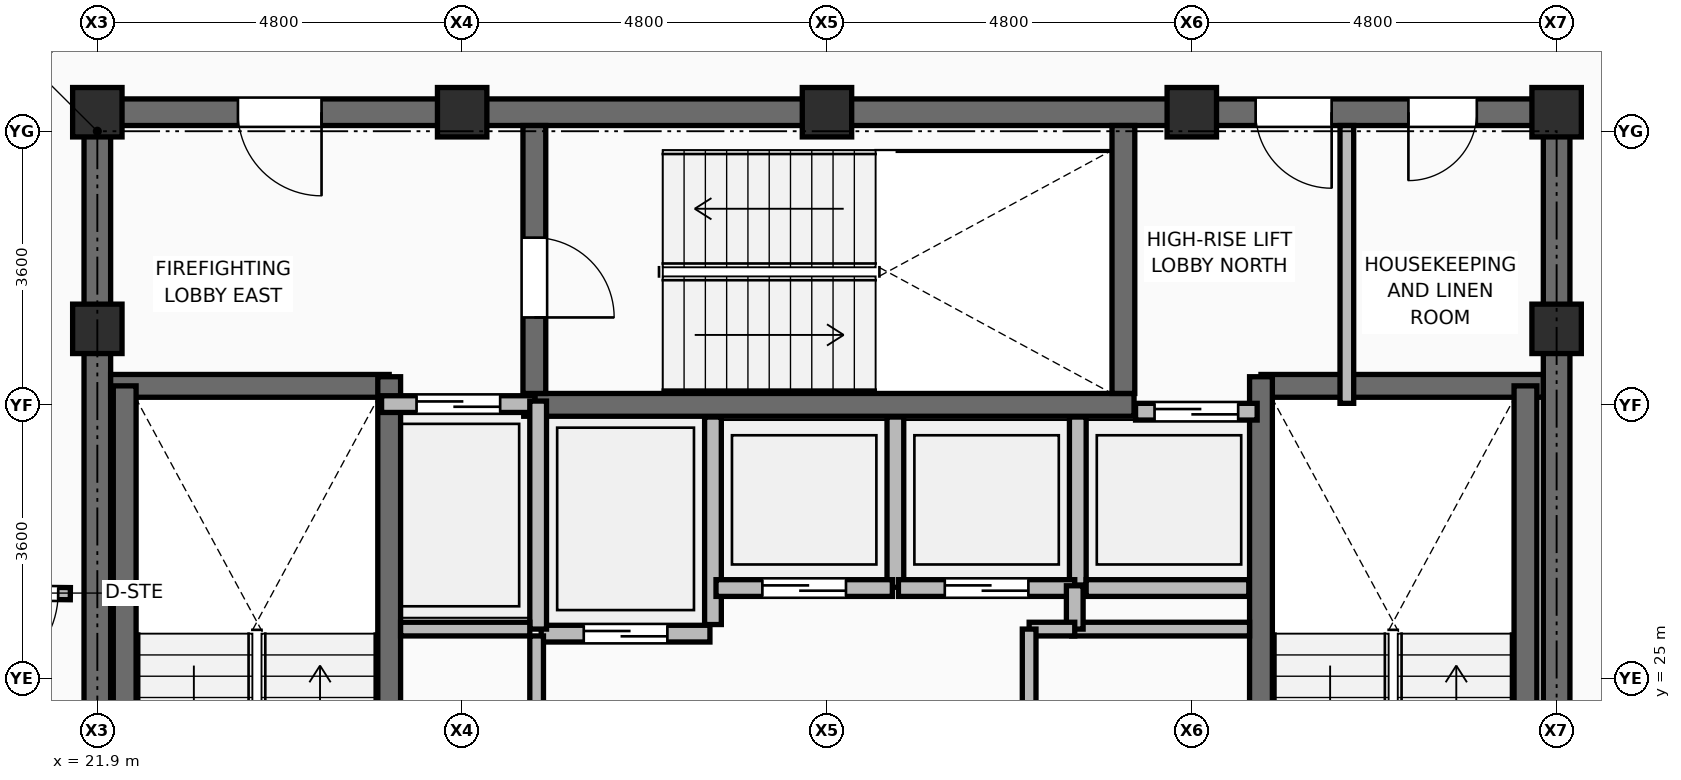
"""IFC4 building model, lengths in metres.
Left out: names, types, materials, properties, quantities, classifications, styles, units other than length and angle.
Written with IfcOpenShell. Run it as: python <this file> out.ifc"""

import sys

from ifc_helpers import new_model, si_unit, direction, frame, frame_2d, origin, origin_2d, place, context, subcontext, project, spatial, rectangle, extrude, element, fill, save


model = new_model("IFC4")
c1 = context("Model", 3, precision=1e-05, world=origin(), true_north=direction((0.0, 1.0)))
c2 = subcontext(c1, "Body", "Model", "MODEL_VIEW")
j1 = project(units=[si_unit("LENGTHUNIT", "METRE"), si_unit("PLANEANGLEUNIT", "RADIAN")], contexts=[c1])
p1 = place(None, origin())
s1 = spatial("IfcSite", under=j1, at=p1, CompositionType="ELEMENT")
p2 = place(p1, origin())
s2 = spatial("IfcBuilding", under=s1, at=p2, CompositionType="ELEMENT")
p3 = place(p2, frame((0.0, 0.0, 275.1)))
s3 = spatial("IfcBuildingStorey", under=s2, at=p3, CompositionType="ELEMENT", Elevation=275.1)
for number, where, z_axis, x_axis in (
    (1, (21.9, 29.6, 0.0), (0.0, 0.0, 1.0), (1.0, 0.0, 0.0)),
    (2, (41.1, 29.6, 0.0), (0.0, 0.0, 1.0), (1.0, 0.0, 0.0)),
    (3, (21.9, 32.45, 0.0), (0.0, 0.0, 1.0), (1.0, 0.0, 0.0)),
    (4, (26.7, 32.45, 0.0), (0.0, 0.0, 1.0), (1.0, 0.0, 0.0)),
    (5, (31.5, 32.45, 0.0), (0.0, 0.0, 1.0), (1.0, 0.0, 0.0)),
    (6, (36.3, 32.45, 0.0), (0.0, 0.0, 1.0), (1.0, 0.0, 0.0)),
    (7, (41.1, 32.45, 0.0), (0.0, 0.0, 1.0), (1.0, 0.0, 0.0)),
):
    element("IfcColumn", number, at=place(p3, frame(where, z_axis=z_axis, x_axis=x_axis)), inside=s3, PredefinedType="COLUMN", context=c2, shape_type="SweptSolid", body=[
        extrude(rectangle(XDim=0.65, YDim=0.65, at=origin_2d()), origin(), (0.0, 0.0, 1.0), 3.75),
    ])
p4 = place(p3, frame((30.0, 25.71, 0.0), z_axis=(0.0, 0.0, 1.0), x_axis=(0.0, 1.0, 0.0)))
e8 = element("IfcWall", 8, at=p4, inside=s3, PredefinedType="PARTITIONING", context=c2, shape_type="SweptSolid", body=[
    extrude(rectangle(XDim=2.73, YDim=0.22, at=frame_2d((1.365, 0.0))), origin(), (0.0, 0.0, 1.0), 3.545),
])
p5 = place(p3, frame((32.4, 26.2, 0.0), z_axis=(0.0, 0.0, 1.0), x_axis=(0.0, 1.0, 0.0)))
e9 = element("IfcWall", 9, at=p5, inside=s3, PredefinedType="PARTITIONING", context=c2, shape_type="SweptSolid", body=[
    extrude(rectangle(XDim=2.24, YDim=0.22, at=frame_2d((1.12, 0.0))), origin(), (0.0, 0.0, 1.0), 3.545),
])
p6 = place(p3, frame((34.8, 26.23, 0.0), z_axis=(0.0, 0.0, 1.0), x_axis=(0.0, 1.0, 0.0)))
e10 = element("IfcWall", 10, at=p6, inside=s3, PredefinedType="PARTITIONING", context=c2, shape_type="SweptSolid", body=[
    extrude(rectangle(XDim=2.21, YDim=0.22, at=frame_2d((1.105, 0.0))), origin(), (0.0, 0.0, 1.0), 3.545),
])
p7 = place(p3, frame((34.91, 26.19, 0.0), z_axis=(0.0, 0.0, 1.0), x_axis=(1.0, 0.0, 0.0)))
e11 = element("IfcWall", 11, at=p7, inside=s3, PredefinedType="PARTITIONING", context=c2, shape_type="SweptSolid", body=[
    extrude(rectangle(XDim=2.14, YDim=0.22, at=frame_2d((1.07, 0.0))), origin(), (0.0, 0.0, 1.0), 3.545),
])
p8 = place(p3, frame((21.725, 32.45, 0.0), z_axis=(0.0, 0.0, 1.0), x_axis=(1.0, 0.0, 0.0)))
e12 = element("IfcWall", 12, at=p8, inside=s3, PredefinedType="SHEAR", context=c2, shape_type="SweptSolid", body=[
    extrude(rectangle(XDim=19.55, YDim=0.35, at=frame_2d((9.775, 0.0))), origin(), (0.0, 0.0, 1.0), 3.57),
])
p9 = place(p8, frame((2.025, 0.0, 0.0)))
e13 = element("IfcOpeningElement", 13, at=p9, cuts=e12, PredefinedType="OPENING", context=c2, shape_type="SweptSolid", body=[
    extrude(rectangle(XDim=1.1, YDim=2.1, at=frame_2d((0.55, 1.05))), frame((0.0, 0.185, 0.0), z_axis=(0.0, -1.0, 0.0), x_axis=(1.0, 0.0, 0.0)), (0.0, 0.0, 1.0), 0.37),
])
p10 = place(p8, frame((15.415, 0.0, 0.0)))
e14 = element("IfcOpeningElement", 14, at=p10, cuts=e12, PredefinedType="OPENING", context=c2, shape_type="SweptSolid", body=[
    extrude(rectangle(XDim=1.0, YDim=2.1, at=frame_2d((0.5, 1.05))), frame((0.0, 0.185, 0.0), z_axis=(0.0, -1.0, 0.0), x_axis=(1.0, 0.0, 0.0)), (0.0, 0.0, 1.0), 0.37),
])
p11 = place(p8, frame((17.425, 0.0, 0.0)))
e15 = element("IfcOpeningElement", 15, at=p11, cuts=e12, PredefinedType="OPENING", context=c2, shape_type="SweptSolid", body=[
    extrude(rectangle(XDim=0.9, YDim=2.1, at=frame_2d((0.45, 1.05))), frame((0.0, 0.185, 0.0), z_axis=(0.0, -1.0, 0.0), x_axis=(1.0, 0.0, 0.0)), (0.0, 0.0, 1.0), 0.37),
])
p12 = place(p3, frame((21.9, 17.975, 0.0), z_axis=(0.0, 0.0, 1.0), x_axis=(0.0, 1.0, 0.0)))
e16 = element("IfcWall", 16, at=p12, inside=s3, PredefinedType="SHEAR", context=c2, shape_type="SweptSolid", body=[
    extrude(rectangle(XDim=14.3, YDim=0.35, at=frame_2d((7.15, 0.0))), origin(), (0.0, 0.0, 1.0), 3.57),
])
p13 = place(p3, frame((41.1, 17.975, 0.0), z_axis=(0.0, 0.0, 1.0), x_axis=(0.0, 1.0, 0.0)))
e17 = element("IfcWall", 17, at=p13, inside=s3, PredefinedType="SHEAR", context=c2, shape_type="SweptSolid", body=[
    extrude(rectangle(XDim=14.3, YDim=0.35, at=frame_2d((7.15, 0.0))), origin(), (0.0, 0.0, 1.0), 3.57),
])
p14 = place(p13, frame((3.485, 0.0, 0.0)))
e18 = element("IfcOpeningElement", 18, at=p14, cuts=e17, PredefinedType="OPENING", context=c2, shape_type="SweptSolid", body=[
    extrude(rectangle(XDim=1.05, YDim=2.1, at=frame_2d((0.525, 1.05))), frame((0.0, 0.185, 0.0), z_axis=(0.0, -1.0, 0.0), x_axis=(1.0, 0.0, 0.0)), (0.0, 0.0, 1.0), 0.37),
])
p15 = place(p3, frame((22.075, 28.85, 0.0), z_axis=(0.0, 0.0, 1.0), x_axis=(1.0, 0.0, 0.0)))
e19 = element("IfcWall", 19, at=p15, inside=s3, PredefinedType="SHEAR", context=c2, shape_type="SweptSolid", body=[
    extrude(rectangle(XDim=3.665, YDim=0.3, at=frame_2d((1.833, 0.0))), origin(), (0.0, 0.0, 1.0), 3.57),
])
p16 = place(p3, frame((25.74, 20.98, 0.0), z_axis=(0.0, 0.0, 1.0), x_axis=(0.0, 1.0, 0.0)))
e20 = element("IfcWall", 20, at=p16, inside=s3, PredefinedType="SHEAR", context=c2, shape_type="SweptSolid", body=[
    extrude(rectangle(XDim=7.99, YDim=0.3, at=frame_2d((3.995, 0.0))), origin(), (0.0, 0.0, 1.0), 3.57),
])
p17 = place(p3, frame((22.26, 21.1, 0.0), z_axis=(0.0, 0.0, 1.0), x_axis=(0.0, 1.0, 0.0)))
e21 = element("IfcWall", 21, at=p17, inside=s3, PredefinedType="SHEAR", context=c2, shape_type="SweptSolid", body=[
    extrude(rectangle(XDim=7.75, YDim=0.3, at=frame_2d((3.875, 0.0))), origin(), (0.0, 0.0, 1.0), 3.57),
])
p18 = place(p3, frame((37.21, 28.85, 0.0), z_axis=(0.0, 0.0, 1.0), x_axis=(1.0, 0.0, 0.0)))
e22 = element("IfcWall", 22, at=p18, inside=s3, PredefinedType="SHEAR", context=c2, shape_type="SweptSolid", body=[
    extrude(rectangle(XDim=3.715, YDim=0.3, at=frame_2d((1.857, 0.0))), origin(), (0.0, 0.0, 1.0), 3.57),
])
p19 = place(p3, frame((37.21, 20.98, 0.0), z_axis=(0.0, 0.0, 1.0), x_axis=(0.0, 1.0, 0.0)))
e23 = element("IfcWall", 23, at=p19, inside=s3, PredefinedType="SHEAR", context=c2, shape_type="SweptSolid", body=[
    extrude(rectangle(XDim=7.99, YDim=0.3, at=frame_2d((3.995, 0.0))), origin(), (0.0, 0.0, 1.0), 3.57),
])
p20 = place(p3, frame((40.69, 22.65, 0.0), z_axis=(0.0, 0.0, 1.0), x_axis=(0.0, 1.0, 0.0)))
e24 = element("IfcWall", 24, at=p20, inside=s3, PredefinedType="SHEAR", context=c2, shape_type="SweptSolid", body=[
    extrude(rectangle(XDim=6.2, YDim=0.3, at=frame_2d((3.1, 0.0))), origin(), (0.0, 0.0, 1.0), 3.57),
])
p21 = place(p3, frame((27.51, 28.6, 0.0), z_axis=(0.0, 0.0, 1.0), x_axis=(1.0, 0.0, 0.0)))
e25 = element("IfcWall", 25, at=p21, inside=s3, PredefinedType="SHEAR", context=c2, shape_type="SweptSolid", body=[
    extrude(rectangle(XDim=8.03, YDim=0.3, at=frame_2d((4.015, 0.0))), origin(), (0.0, 0.0, 1.0), 3.57),
])
p22 = place(p3, frame((27.65, 28.75, 0.0), z_axis=(0.0, 0.0, 1.0), x_axis=(0.0, 1.0, 0.0)))
e26 = element("IfcWall", 26, at=p22, inside=s3, PredefinedType="SHEAR", context=c2, shape_type="SweptSolid", body=[
    extrude(rectangle(XDim=3.525, YDim=0.3, at=frame_2d((1.762, 0.0))), origin(), (0.0, 0.0, 1.0), 3.57),
])
p23 = place(p22, frame((1.0, 0.0, 0.0)))
e27 = element("IfcOpeningElement", 27, at=p23, cuts=e26, PredefinedType="OPENING", context=c2, shape_type="SweptSolid", body=[
    extrude(rectangle(XDim=1.05, YDim=2.1, at=frame_2d((0.525, 1.05))), frame((0.0, 0.16, 0.0), z_axis=(0.0, -1.0, 0.0), x_axis=(1.0, 0.0, 0.0)), (0.0, 0.0, 1.0), 0.32),
])
p24 = place(p3, frame((35.4, 28.75, 0.0), z_axis=(0.0, 0.0, 1.0), x_axis=(0.0, 1.0, 0.0)))
e28 = element("IfcWall", 28, at=p24, inside=s3, PredefinedType="SHEAR", context=c2, shape_type="SweptSolid", body=[
    extrude(rectangle(XDim=3.525, YDim=0.3, at=frame_2d((1.762, 0.0))), origin(), (0.0, 0.0, 1.0), 3.57),
])
p25 = place(p3, frame((25.64, 28.61, 0.0), z_axis=(0.0, 0.0, 1.0), x_axis=(1.0, 0.0, 0.0)))
e29 = element("IfcWall", 29, at=p25, inside=s3, PredefinedType="PARTITIONING", context=c2, shape_type="SweptSolid", body=[
    extrude(rectangle(XDim=2.02, YDim=0.22, at=frame_2d((1.01, 0.0))), origin(), (0.0, 0.0, 1.0), 3.55),
])
p26 = place(p25, frame((0.46, 0.0, 0.0)))
e30 = element("IfcOpeningElement", 30, at=p26, cuts=e29, PredefinedType="OPENING", context=c2, shape_type="SweptSolid", body=[
    extrude(rectangle(XDim=1.1, YDim=2.2, at=frame_2d((0.55, 1.1))), frame((0.0, 0.12, 0.0), z_axis=(0.0, -1.0, 0.0), x_axis=(1.0, 0.0, 0.0)), (0.0, 0.0, 1.0), 0.24),
])
p27 = place(p3, frame((27.74, 25.59, 0.0), z_axis=(0.0, 0.0, 1.0), x_axis=(1.0, 0.0, 0.0)))
e31 = element("IfcWall", 31, at=p27, inside=s3, PredefinedType="PARTITIONING", context=c2, shape_type="SweptSolid", body=[
    extrude(rectangle(XDim=2.22, YDim=0.22, at=frame_2d((1.11, 0.0))), origin(), (0.0, 0.0, 1.0), 3.55),
])
p28 = place(p27, frame((0.56, 0.0, 0.0)))
e32 = element("IfcOpeningElement", 32, at=p28, cuts=e31, PredefinedType="OPENING", context=c2, shape_type="SweptSolid", body=[
    extrude(rectangle(XDim=1.1, YDim=2.2, at=frame_2d((0.55, 1.1))), frame((0.0, 0.12, 0.0), z_axis=(0.0, -1.0, 0.0), x_axis=(1.0, 0.0, 0.0)), (0.0, 0.0, 1.0), 0.24),
])
p29 = place(p3, frame((30.04, 26.19, 0.0), z_axis=(0.0, 0.0, 1.0), x_axis=(1.0, 0.0, 0.0)))
e33 = element("IfcWall", 33, at=p29, inside=s3, PredefinedType="PARTITIONING", context=c2, shape_type="SweptSolid", body=[
    extrude(rectangle(XDim=2.32, YDim=0.22, at=frame_2d((1.16, 0.0))), origin(), (0.0, 0.0, 1.0), 3.55),
])
p30 = place(p29, frame((0.61, 0.0, 0.0)))
e34 = element("IfcOpeningElement", 34, at=p30, cuts=e33, PredefinedType="OPENING", context=c2, shape_type="SweptSolid", body=[
    extrude(rectangle(XDim=1.1, YDim=2.2, at=frame_2d((0.55, 1.1))), frame((0.0, 0.12, 0.0), z_axis=(0.0, -1.0, 0.0), x_axis=(1.0, 0.0, 0.0)), (0.0, 0.0, 1.0), 0.24),
])
p31 = place(p3, frame((32.44, 26.19, 0.0), z_axis=(0.0, 0.0, 1.0), x_axis=(1.0, 0.0, 0.0)))
e35 = element("IfcWall", 35, at=p31, inside=s3, PredefinedType="PARTITIONING", context=c2, shape_type="SweptSolid", body=[
    extrude(rectangle(XDim=2.32, YDim=0.22, at=frame_2d((1.16, 0.0))), origin(), (0.0, 0.0, 1.0), 3.55),
])
p32 = place(p31, frame((0.61, 0.0, 0.0)))
e36 = element("IfcOpeningElement", 36, at=p32, cuts=e35, PredefinedType="OPENING", context=c2, shape_type="SweptSolid", body=[
    extrude(rectangle(XDim=1.1, YDim=2.2, at=frame_2d((0.55, 1.1))), frame((0.0, 0.12, 0.0), z_axis=(0.0, -1.0, 0.0), x_axis=(1.0, 0.0, 0.0)), (0.0, 0.0, 1.0), 0.24),
])
p33 = place(p3, frame((35.56, 28.51, 0.0), z_axis=(0.0, 0.0, 1.0), x_axis=(1.0, 0.0, 0.0)))
e37 = element("IfcWall", 37, at=p33, inside=s3, PredefinedType="PARTITIONING", context=c2, shape_type="SweptSolid", body=[
    extrude(rectangle(XDim=1.6, YDim=0.22, at=frame_2d((0.8, 0.0))), origin(), (0.0, 0.0, 1.0), 3.55),
])
p34 = place(p33, frame((0.25, 0.0, 0.0)))
e38 = element("IfcOpeningElement", 38, at=p34, cuts=e37, PredefinedType="OPENING", context=c2, shape_type="SweptSolid", body=[
    extrude(rectangle(XDim=1.1, YDim=2.2, at=frame_2d((0.55, 1.1))), frame((0.0, 0.12, 0.0), z_axis=(0.0, -1.0, 0.0), x_axis=(1.0, 0.0, 0.0)), (0.0, 0.0, 1.0), 0.24),
])
p35 = place(p3, frame((27.7, 25.65, 0.0), z_axis=(0.0, 0.0, 1.0), x_axis=(0.0, 1.0, 0.0)))
e39 = element("IfcWall", 39, at=p35, inside=s3, PredefinedType="PARTITIONING", context=c2, shape_type="SweptSolid", body=[
    extrude(rectangle(XDim=3.0, YDim=0.22, at=frame_2d((1.5, 0.0))), origin(), (0.0, 0.0, 1.0), 3.55),
])
p36 = place(p3, frame((25.89, 25.65, 0.0), z_axis=(0.0, 0.0, 1.0), x_axis=(1.0, 0.0, 0.0)))
e40 = element("IfcWall", 40, at=p36, inside=s3, PredefinedType="PARTITIONING", context=c2, shape_type="SweptSolid", body=[
    extrude(rectangle(XDim=1.7, YDim=0.18, at=frame_2d((0.85, 0.0))), origin(), (0.0, 0.0, 1.0), 3.55),
])
p37 = place(p3, frame((27.68, 24.16, 0.0), z_axis=(0.0, 0.0, 1.0), x_axis=(0.0, 1.0, 0.0)))
e41 = element("IfcWall", 41, at=p37, inside=s3, PredefinedType="PARTITIONING", context=c2, shape_type="SweptSolid", body=[
    extrude(rectangle(XDim=1.4, YDim=0.18, at=frame_2d((0.7, 0.0))), origin(), (0.0, 0.0, 1.0), 3.55),
])
p38 = place(p3, frame((34.72, 25.65, 0.0), z_axis=(0.0, 0.0, 1.0), x_axis=(1.0, 0.0, 0.0)))
e42 = element("IfcWall", 42, at=p38, inside=s3, PredefinedType="PARTITIONING", context=c2, shape_type="SweptSolid", body=[
    extrude(rectangle(XDim=2.34, YDim=0.18, at=frame_2d((1.17, 0.0))), origin(), (0.0, 0.0, 1.0), 3.55),
])
p39 = place(p3, frame((34.76, 25.65, 0.0), z_axis=(0.0, 0.0, 1.0), x_axis=(0.0, 1.0, 0.0)))
e43 = element("IfcWall", 43, at=p39, inside=s3, PredefinedType="PARTITIONING", context=c2, shape_type="SweptSolid", body=[
    extrude(rectangle(XDim=0.57, YDim=0.22, at=frame_2d((0.285, 0.0))), origin(), (0.0, 0.0, 1.0), 3.55),
])
p40 = place(p3, frame((34.16, 25.65, 0.0), z_axis=(0.0, 0.0, 1.0), x_axis=(1.0, 0.0, 0.0)))
e44 = element("IfcWall", 44, at=p40, inside=s3, PredefinedType="PARTITIONING", context=c2, shape_type="SweptSolid", body=[
    extrude(rectangle(XDim=0.6, YDim=0.18, at=frame_2d((0.3, 0.0))), origin(), (0.0, 0.0, 1.0), 3.55),
])
p41 = place(p3, frame((34.16, 21.1, 0.0), z_axis=(0.0, 0.0, 1.0), x_axis=(0.0, 1.0, 0.0)))
e45 = element("IfcWall", 45, at=p41, inside=s3, PredefinedType="PARTITIONING", context=c2, shape_type="SweptSolid", body=[
    extrude(rectangle(XDim=4.55, YDim=0.18, at=frame_2d((2.275, 0.0))), origin(), (0.0, 0.0, 1.0), 3.55),
])
p42 = place(p41, frame((1.825, 0.0, 0.0)))
e46 = element("IfcOpeningElement", 46, at=p42, cuts=e45, PredefinedType="OPENING", context=c2, shape_type="SweptSolid", body=[
    extrude(rectangle(XDim=0.9, YDim=2.1, at=frame_2d((0.45, 1.05))), frame((0.0, 0.1, 0.0), z_axis=(0.0, -1.0, 0.0), x_axis=(1.0, 0.0, 0.0)), (0.0, 0.0, 1.0), 0.2),
])
p43 = place(p3, frame((38.34, 28.62, 0.0), z_axis=(0.0, 0.0, 1.0), x_axis=(0.0, 1.0, 0.0)))
e47 = element("IfcWall", 47, at=p43, inside=s3, PredefinedType="PARTITIONING", context=c2, shape_type="SweptSolid", body=[
    extrude(rectangle(XDim=3.655, YDim=0.18, at=frame_2d((1.827, 0.0))), origin(), (0.0, 0.0, 1.0), 3.132),
])
p44 = place(p3, frame((21.545, 26.116, 0.0), z_axis=(0.0, 0.0, 1.0), x_axis=(-0.999947421001, 0.010254522592, 0.0)))
e48 = element("IfcWall", 48, at=p44, inside=s3, PredefinedType="PARTITIONING", context=c2, shape_type="SweptSolid", body=[
    extrude(rectangle(XDim=1.857, YDim=0.16, at=frame_2d((0.928, 0.0))), origin(), (0.0, 0.0, 1.0), 2.595),
])
p45 = place(p44, frame((0.16, 0.0, 0.0)))
e49 = element("IfcOpeningElement", 49, at=p45, cuts=e48, PredefinedType="OPENING", context=c2, shape_type="SweptSolid", body=[
    extrude(rectangle(XDim=1.2, YDim=2.1, at=frame_2d((0.6, 1.05))), frame((0.0, 0.09, 0.0), z_axis=(0.0, -1.0, 0.0), x_axis=(1.0, 0.0, 0.0)), (0.0, 0.0, 1.0), 0.18),
])
p46 = place(p3, frame((20.465, 32.652, 0.0), z_axis=(0.0, 0.0, 1.0), x_axis=(0.754005434477, 0.65686817915, 0.0)))
e50 = element("IfcWall", 50, at=p46, inside=s3, PredefinedType="PARTITIONING", context=c2, shape_type="SweptSolid", body=[
    extrude(rectangle(XDim=2.305, YDim=0.16, at=frame_2d((1.152, 0.0))), origin(), (0.0, 0.0, 1.0), 3.132),
])
p47 = place(p23, frame((1.05, 0.0, 0.0), z_axis=(0.0, 0.0, 1.0), x_axis=(-1.0, 0.0, 0.0)))
e51 = element("IfcDoor", 51, at=p47, inside=s3, OperationType="SINGLE_SWING_RIGHT", PredefinedType="DOOR", context=c2, shape_type="SweptSolid", body=[
    extrude(rectangle(XDim=1.05, YDim=2.1, at=frame_2d((0.525, 1.05))), frame((0.0, 0.025, 0.0), z_axis=(0.0, -1.0, 0.0), x_axis=(1.0, 0.0, 0.0)), (0.0, 0.0, 1.0), 0.05),
])
fill(e27, e51)
p48 = place(p26, origin())
e52 = element("IfcDoor", 52, at=p48, inside=s3, OperationType="DOUBLE_DOOR_SLIDING", PredefinedType="DOOR", context=c2, shape_type="SweptSolid", body=[
    extrude(rectangle(XDim=1.1, YDim=2.2, at=frame_2d((0.55, 1.1))), frame((0.0, 0.025, 0.0), z_axis=(0.0, -1.0, 0.0), x_axis=(1.0, 0.0, 0.0)), (0.0, 0.0, 1.0), 0.05),
])
fill(e30, e52)
p49 = place(p28, frame((1.1, 0.0, 0.0), z_axis=(0.0, 0.0, 1.0), x_axis=(-1.0, 0.0, 0.0)))
e53 = element("IfcDoor", 53, at=p49, inside=s3, OperationType="DOUBLE_DOOR_SLIDING", PredefinedType="DOOR", context=c2, shape_type="SweptSolid", body=[
    extrude(rectangle(XDim=1.1, YDim=2.2, at=frame_2d((0.55, 1.1))), frame((0.0, 0.025, 0.0), z_axis=(0.0, -1.0, 0.0), x_axis=(1.0, 0.0, 0.0)), (0.0, 0.0, 1.0), 0.05),
])
fill(e32, e53)
p50 = place(p30, frame((1.1, 0.0, 0.0), z_axis=(0.0, 0.0, 1.0), x_axis=(-1.0, 0.0, 0.0)))
e54 = element("IfcDoor", 54, at=p50, inside=s3, OperationType="DOUBLE_DOOR_SLIDING", PredefinedType="DOOR", context=c2, shape_type="SweptSolid", body=[
    extrude(rectangle(XDim=1.1, YDim=2.2, at=frame_2d((0.55, 1.1))), frame((0.0, 0.025, 0.0), z_axis=(0.0, -1.0, 0.0), x_axis=(1.0, 0.0, 0.0)), (0.0, 0.0, 1.0), 0.05),
])
fill(e34, e54)
p51 = place(p32, frame((1.1, 0.0, 0.0), z_axis=(0.0, 0.0, 1.0), x_axis=(-1.0, 0.0, 0.0)))
e55 = element("IfcDoor", 55, at=p51, inside=s3, OperationType="DOUBLE_DOOR_SLIDING", PredefinedType="DOOR", context=c2, shape_type="SweptSolid", body=[
    extrude(rectangle(XDim=1.1, YDim=2.2, at=frame_2d((0.55, 1.1))), frame((0.0, 0.025, 0.0), z_axis=(0.0, -1.0, 0.0), x_axis=(1.0, 0.0, 0.0)), (0.0, 0.0, 1.0), 0.05),
])
fill(e36, e55)
p52 = place(p34, origin())
e56 = element("IfcDoor", 56, at=p52, inside=s3, OperationType="DOUBLE_DOOR_SLIDING", PredefinedType="DOOR", context=c2, shape_type="SweptSolid", body=[
    extrude(rectangle(XDim=1.1, YDim=2.2, at=frame_2d((0.55, 1.1))), frame((0.0, 0.025, 0.0), z_axis=(0.0, -1.0, 0.0), x_axis=(1.0, 0.0, 0.0)), (0.0, 0.0, 1.0), 0.05),
])
fill(e38, e56)
p53 = place(p9, frame((1.1, 0.0, 0.0), z_axis=(0.0, 0.0, 1.0), x_axis=(-1.0, 0.0, 0.0)))
e57 = element("IfcDoor", 57, at=p53, inside=s3, OperationType="SINGLE_SWING_LEFT", PredefinedType="DOOR", context=c2, shape_type="SweptSolid", body=[
    extrude(rectangle(XDim=1.1, YDim=2.1, at=frame_2d((0.55, 1.05))), frame((0.0, 0.025, 0.0), z_axis=(0.0, -1.0, 0.0), x_axis=(1.0, 0.0, 0.0)), (0.0, 0.0, 1.0), 0.05),
])
fill(e13, e57)
p54 = place(p10, frame((1.0, 0.0, 0.0), z_axis=(0.0, 0.0, 1.0), x_axis=(-1.0, 0.0, 0.0)))
e58 = element("IfcDoor", 58, at=p54, inside=s3, OperationType="SINGLE_SWING_LEFT", PredefinedType="DOOR", context=c2, shape_type="SweptSolid", body=[
    extrude(rectangle(XDim=1.0, YDim=2.1, at=frame_2d((0.5, 1.05))), frame((0.0, 0.025, 0.0), z_axis=(0.0, -1.0, 0.0), x_axis=(1.0, 0.0, 0.0)), (0.0, 0.0, 1.0), 0.05),
])
fill(e14, e58)
p55 = place(p11, frame((0.9, 0.0, 0.0), z_axis=(0.0, 0.0, 1.0), x_axis=(-1.0, 0.0, 0.0)))
e59 = element("IfcDoor", 59, at=p55, inside=s3, OperationType="SINGLE_SWING_RIGHT", PredefinedType="DOOR", context=c2, shape_type="SweptSolid", body=[
    extrude(rectangle(XDim=0.9, YDim=2.1, at=frame_2d((0.45, 1.05))), frame((0.0, 0.025, 0.0), z_axis=(0.0, -1.0, 0.0), x_axis=(1.0, 0.0, 0.0)), (0.0, 0.0, 1.0), 0.05),
])
fill(e15, e59)
p56 = place(p45, origin())
e60 = element("IfcDoor", 60, at=p56, inside=s3, OperationType="SINGLE_SWING_RIGHT", PredefinedType="DOOR", context=c2, shape_type="SweptSolid", body=[
    extrude(rectangle(XDim=1.2, YDim=2.1, at=frame_2d((0.6, 1.05))), frame((0.0, 0.025, 0.0), z_axis=(0.0, -1.0, 0.0), x_axis=(1.0, 0.0, 0.0)), (0.0, 0.0, 1.0), 0.05),
])
fill(e49, e60)
save(model, sys.argv[1])
